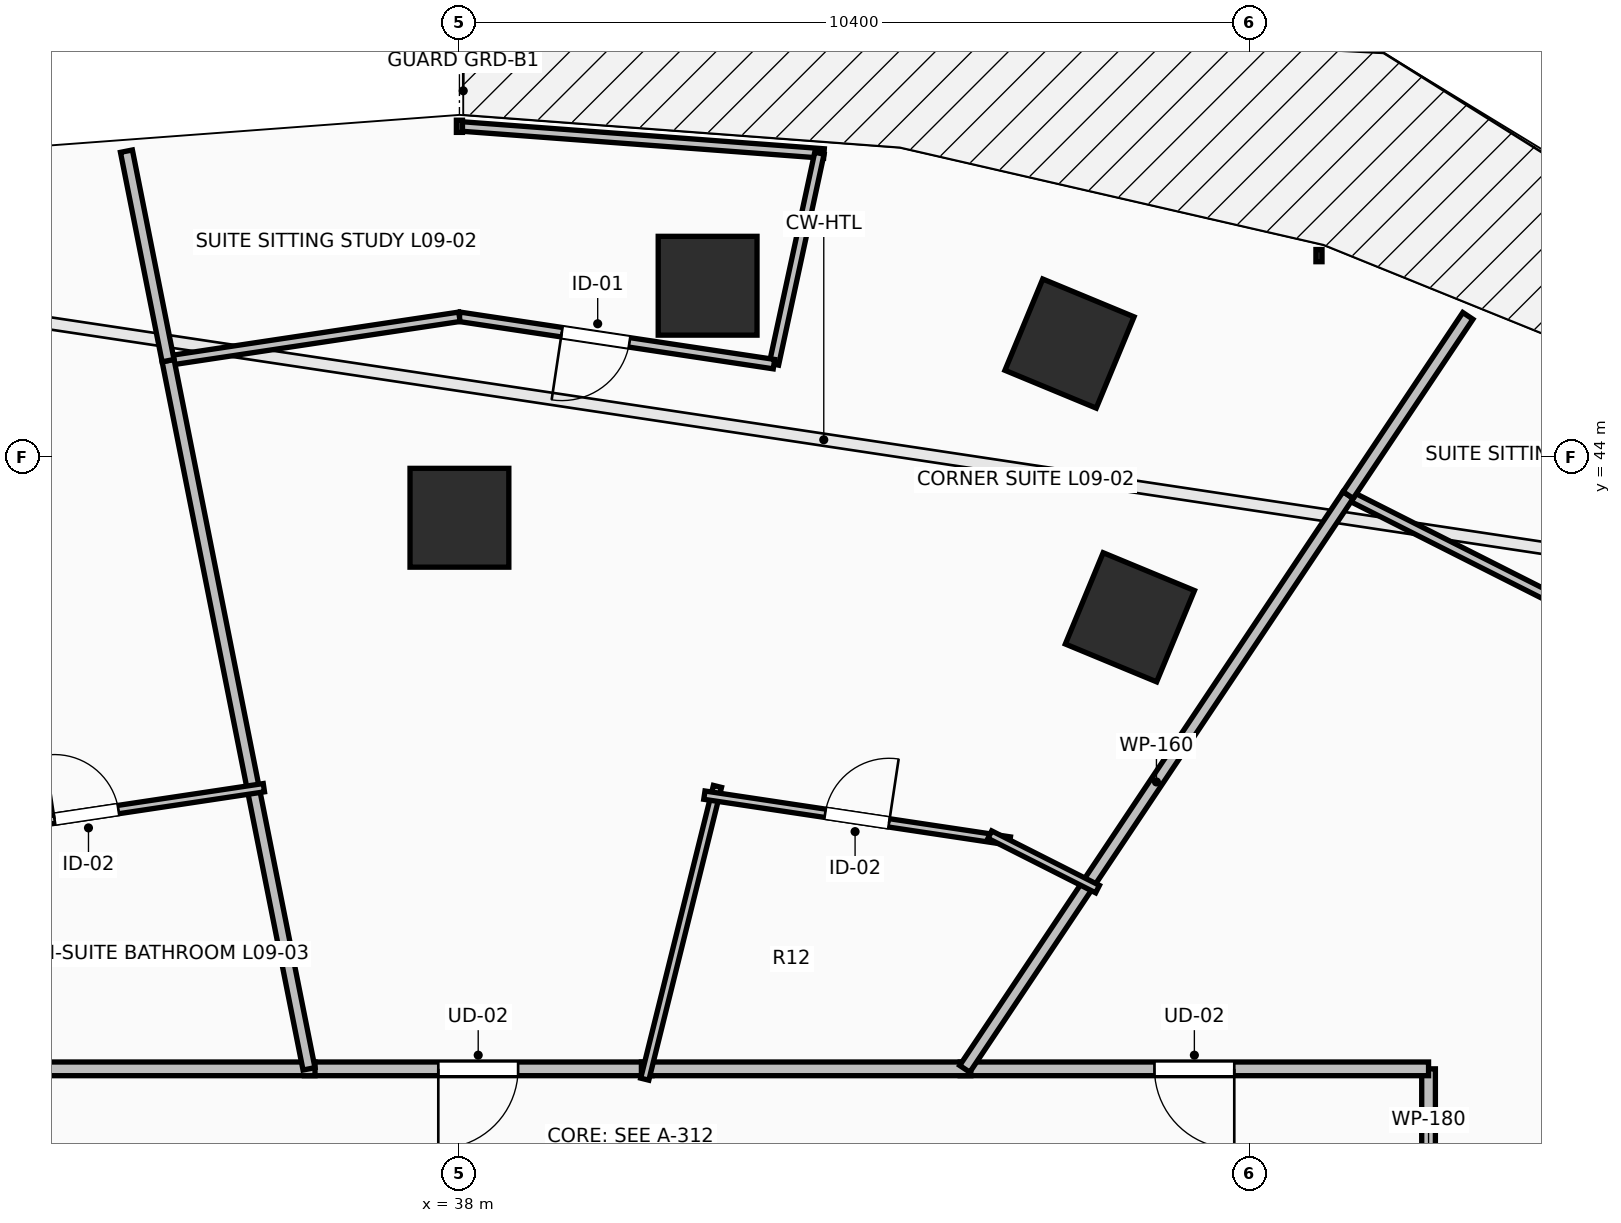
"""IFC4 building model, lengths in metres.
Left out: names, types, materials, properties, quantities, classifications, styles, units other than length and angle.
Written with IfcOpenShell. Run it as: python <this file> out.ifc"""

import sys

from ifc_helpers import new_model, si_unit, direction, frame, frame_2d, origin, origin_2d, place, context, subcontext, project, spatial, rectangle, extrude, element, fill, save


model = new_model("IFC4")
c1 = context("Model", 3, precision=1e-05, world=origin(), true_north=direction((0.0, 1.0)))
c2 = subcontext(c1, "Body", "Model", "MODEL_VIEW")
j1 = project(units=[si_unit("LENGTHUNIT", "METRE"), si_unit("PLANEANGLEUNIT", "RADIAN")], contexts=[c1])
p1 = place(None, origin())
s1 = spatial("IfcSite", under=j1, at=p1, CompositionType="ELEMENT")
p2 = place(p1, origin())
s2 = spatial("IfcBuilding", under=s1, at=p2, CompositionType="ELEMENT")
p3 = place(p2, frame((0.0, 0.0, 38.0)))
s3 = spatial("IfcBuildingStorey", under=s2, at=p3, CompositionType="ELEMENT", Elevation=38.0)
for number, where, z_axis, x_axis in (
    (1, (46.821, 41.891, 0.0), (0.0, 0.0, 1.0), (0.383, 0.924, 0.0)),
    (2, (38.0, 43.2, 0.0), (0.0, 0.0, 1.0), (0.0, 1.0, 0.0)),
    (3, (46.026, 45.492, 0.0), (0.0, 0.0, 1.0), (0.383, 0.924, 0.0)),
    (4, (41.265, 46.252, 0.0), (0.0, 0.0, 1.0), (0.0, 1.0, 0.0)),
):
    element("IfcColumn", number, at=place(p3, frame(where, z_axis=z_axis, x_axis=x_axis)), inside=s3, PredefinedType="COLUMN", context=c2, shape_type="SweptSolid", body=[
        extrude(rectangle(XDim=1.3, YDim=1.3, at=origin_2d()), origin(), (0.0, 0.0, 1.0), 3.5),
    ])
p4 = place(p3, frame((50.75, 33.616, 0.0), z_axis=(0.0, 0.0, 1.0), x_axis=(0.0, 1.0, 0.0)))
e5 = element("IfcWall", 5, at=p4, inside=s3, PredefinedType="PARTITIONING", context=c2, shape_type="SweptSolid", body=[
    extrude(rectangle(XDim=2.334, YDim=0.18, at=frame_2d((1.167, 0.0))), origin(), (0.0, 0.0, 1.0), 2.432),
])
p5 = place(p3, frame((50.75, 35.95, 0.0), z_axis=(0.0, 0.0, 1.0), x_axis=(-1.0, 0.0, 0.0)))
e6 = element("IfcWall", 6, at=p5, inside=s3, PredefinedType="PARTITIONING", context=c2, shape_type="SweptSolid", body=[
    extrude(rectangle(XDim=6.162, YDim=0.18, at=frame_2d((3.081, 0.0))), origin(), (0.0, 0.0, 1.0), 2.432),
])
p6 = place(p5, frame((2.556, 0.0, 0.0)))
e7 = element("IfcOpeningElement", 7, at=p6, cuts=e6, PredefinedType="OPENING", context=c2, shape_type="SweptSolid", body=[
    extrude(rectangle(XDim=1.05, YDim=2.2, at=frame_2d((0.525, 1.1))), frame((0.0, 0.105, 0.0), z_axis=(0.0, -1.0, 0.0), x_axis=(1.0, 0.0, 0.0)), (0.0, 0.0, 1.0), 0.21),
])
p7 = place(p3, frame((40.534, 35.95, 0.0), z_axis=(0.0, 0.0, 1.0), x_axis=(-1.0, 0.0, 0.0)))
e8 = element("IfcWall", 8, at=p7, inside=s3, PredefinedType="PARTITIONING", context=c2, shape_type="SweptSolid", body=[
    extrude(rectangle(XDim=4.574, YDim=0.18, at=frame_2d((2.287, 0.0))), origin(), (0.0, 0.0, 1.0), 3.24),
])
p8 = place(p7, frame((1.762, 0.0, 0.0)))
e9 = element("IfcOpeningElement", 9, at=p8, cuts=e8, PredefinedType="OPENING", context=c2, shape_type="SweptSolid", body=[
    extrude(rectangle(XDim=1.05, YDim=2.2, at=frame_2d((0.525, 1.1))), frame((0.0, 0.105, 0.0), z_axis=(0.0, -1.0, 0.0), x_axis=(1.0, 0.0, 0.0)), (0.0, 0.0, 1.0), 0.21),
])
p9 = place(p3, frame((44.728, 35.95, 0.0), z_axis=(0.0, 0.0, 1.0), x_axis=(-1.0, 0.0, 0.0)))
e10 = element("IfcWall", 10, at=p9, inside=s3, PredefinedType="PARTITIONING", context=c2, shape_type="SweptSolid", body=[
    extrude(rectangle(XDim=4.334, YDim=0.18, at=frame_2d((2.167, 0.0))), origin(), (0.0, 0.0, 1.0), 3.24),
])
p10 = place(p3, frame((36.1, 35.95, 0.0), z_axis=(0.0, 0.0, 1.0), x_axis=(-1.0, 0.0, 0.0)))
e11 = element("IfcWall", 11, at=p10, inside=s3, PredefinedType="PARTITIONING", context=c2, shape_type="SweptSolid", body=[
    extrude(rectangle(XDim=4.17, YDim=0.18, at=frame_2d((2.085, 0.0))), origin(), (0.0, 0.0, 1.0), 3.24),
])
p11 = place(p3, frame((56.554, 40.032, 0.0), z_axis=(0.0, 0.0, 1.0), x_axis=(-0.892545780062, 0.450956794487, 0.0)))
e12 = element("IfcWall", 12, at=p11, inside=s3, PredefinedType="PARTITIONING", context=c2, shape_type="SweptSolid", body=[
    extrude(rectangle(XDim=7.688, YDim=0.125, at=frame_2d((3.844, 0.0))), origin(), (0.0, 0.0, 1.0), 2.432),
])
p12 = place(p11, frame((3.394, 0.0, 0.0)))
e13 = element("IfcOpeningElement", 13, at=p12, cuts=e12, PredefinedType="OPENING", context=c2, shape_type="SweptSolid", body=[
    extrude(rectangle(XDim=0.9, YDim=2.1, at=frame_2d((0.45, 1.05))), frame((0.0, 0.077, 0.0), z_axis=(0.0, -1.0, 0.0), x_axis=(1.0, 0.0, 0.0)), (0.0, 0.0, 1.0), 0.155),
])
p13 = place(p3, frame((49.692, 43.499, 0.0), z_axis=(0.0, 0.0, 1.0), x_axis=(-0.555556259167, -0.831478949163, 0.0)))
e14 = element("IfcWall", 14, at=p13, inside=s3, PredefinedType="PARTITIONING", context=c2, shape_type="SweptSolid", body=[
    extrude(rectangle(XDim=9.079, YDim=0.16, at=frame_2d((4.54, 0.0))), origin(), (0.0, 0.0, 1.0), 2.432),
])
p14 = place(p3, frame((51.267, 45.856, 0.0), z_axis=(0.0, 0.0, 1.0), x_axis=(-0.555653789226, -0.831413775757, 0.0)))
e15 = element("IfcWall", 15, at=p14, inside=s3, PredefinedType="PARTITIONING", context=c2, shape_type="SweptSolid", body=[
    extrude(rectangle(XDim=2.835, YDim=0.16, at=frame_2d((1.417, 0.0))), origin(), (0.0, 0.0, 1.0), 2.624),
])
p15 = place(p3, frame((40.438, 35.814, 0.0), z_axis=(0.0, 0.0, 1.0), x_axis=(0.24101554649, 0.970521254971, 0.0)))
e16 = element("IfcWall", 16, at=p15, inside=s3, PredefinedType="PARTITIONING", context=c2, shape_type="SweptSolid", body=[
    extrude(rectangle(XDim=3.969, YDim=0.11, at=frame_2d((1.984, 0.0))), origin(), (0.0, 0.0, 1.0), 2.972),
])
p16 = place(p3, frame((41.223, 39.551, 0.0), z_axis=(0.0, 0.0, 1.0), x_axis=(0.988911221338, -0.148507899833, 0.0)))
e17 = element("IfcWall", 17, at=p16, inside=s3, PredefinedType="PARTITIONING", context=c2, shape_type="SweptSolid", body=[
    extrude(rectangle(XDim=4.064, YDim=0.11, at=frame_2d((2.032, 0.0))), origin(), (0.0, 0.0, 1.0), 3.24),
])
p17 = place(p16, frame((1.607, 0.0, 0.0)))
e18 = element("IfcOpeningElement", 18, at=p17, cuts=e17, PredefinedType="OPENING", context=c2, shape_type="SweptSolid", body=[
    extrude(rectangle(XDim=0.85, YDim=2.1, at=frame_2d((0.425, 1.05))), frame((0.0, 0.07, 0.0), z_axis=(0.0, -1.0, 0.0), x_axis=(1.0, 0.0, 0.0)), (0.0, 0.0, 1.0), 0.14),
])
p18 = place(p3, frame((44.978, 39.031, 0.0), z_axis=(0.0, 0.0, 1.0), x_axis=(0.892388427115, -0.451268096758, 0.0)))
e19 = element("IfcWall", 19, at=p18, inside=s3, PredefinedType="PARTITIONING", context=c2, shape_type="SweptSolid", body=[
    extrude(rectangle(XDim=1.588, YDim=0.11, at=frame_2d((0.794, 0.0))), origin(), (0.0, 0.0, 1.0), 3.24),
])
p19 = place(p3, frame((42.796, 47.992, 0.0), z_axis=(0.0, 0.0, 1.0), x_axis=(-0.99722311136, 0.074471915311, 0.0)))
e20 = element("IfcWall", 20, at=p19, inside=s3, PredefinedType="PARTITIONING", context=c2, shape_type="SweptSolid", body=[
    extrude(rectangle(XDim=4.809, YDim=0.125, at=frame_2d((2.405, 0.0))), origin(), (0.0, 0.0, 1.0), 3.24),
])
p20 = place(p3, frame((42.736, 47.996, 0.0), z_axis=(0.0, 0.0, 1.0), x_axis=(-0.210697687201, -0.977551269555, 0.0)))
e21 = element("IfcWall", 21, at=p20, inside=s3, PredefinedType="PARTITIONING", context=c2, shape_type="SweptSolid", body=[
    extrude(rectangle(XDim=2.839, YDim=0.125, at=frame_2d((1.419, 0.0))), origin(), (0.0, 0.0, 1.0), 2.624),
])
p21 = place(p3, frame((42.138, 45.221, 0.0), z_axis=(0.0, 0.0, 1.0), x_axis=(-0.988853606593, 0.148891049857, 0.0)))
e22 = element("IfcWall", 22, at=p21, inside=s3, PredefinedType="PARTITIONING", context=c2, shape_type="SweptSolid", body=[
    extrude(rectangle(XDim=4.185, YDim=0.125, at=frame_2d((2.092, 0.0))), origin(), (0.0, 0.0, 1.0), 2.432),
])
p22 = place(p21, frame((1.922, 0.0, 0.0)))
e23 = element("IfcOpeningElement", 23, at=p22, cuts=e22, PredefinedType="OPENING", context=c2, shape_type="SweptSolid", body=[
    extrude(rectangle(XDim=0.9, YDim=2.1, at=frame_2d((0.45, 1.05))), frame((0.0, 0.077, 0.0), z_axis=(0.0, -1.0, 0.0), x_axis=(1.0, 0.0, 0.0)), (0.0, 0.0, 1.0), 0.155),
])
p23 = place(p3, frame((38.0, 45.844, 0.0), z_axis=(0.0, 0.0, 1.0), x_axis=(-0.988862311426, -0.148833225599, 0.0)))
e24 = element("IfcWall", 24, at=p23, inside=s3, PredefinedType="PARTITIONING", context=c2, shape_type="SweptSolid", body=[
    extrude(rectangle(XDim=3.876, YDim=0.125, at=frame_2d((1.938, 0.0))), origin(), (0.0, 0.0, 1.0), 2.624),
])
p24 = place(p3, frame((34.167, 45.267, 0.0), z_axis=(0.0, 0.0, 1.0), x_axis=(0.19516219459, -0.980770981322, 0.0)))
e25 = element("IfcWall", 25, at=p24, inside=s3, PredefinedType="PARTITIONING", context=c2, shape_type="SweptSolid", body=[
    extrude(rectangle(XDim=9.5, YDim=0.16, at=frame_2d((4.75, 0.0))), origin(), (0.0, 0.0, 1.0), 2.432),
])
p25 = place(p3, frame((33.619, 48.023, 0.0), z_axis=(0.0, 0.0, 1.0), x_axis=(0.195063341769, -0.980790646722, 0.0)))
e26 = element("IfcWall", 26, at=p25, inside=s3, PredefinedType="PARTITIONING", context=c2, shape_type="SweptSolid", body=[
    extrude(rectangle(XDim=2.81, YDim=0.16, at=frame_2d((1.405, 0.0))), origin(), (0.0, 0.0, 1.0), 2.624),
])
p26 = place(p3, frame((30.759, 38.947, 0.0), z_axis=(0.0, 0.0, 1.0), x_axis=(0.9889029502, 0.148562966739, 0.0)))
e27 = element("IfcWall", 27, at=p26, inside=s3, PredefinedType="PARTITIONING", context=c2, shape_type="SweptSolid", body=[
    extrude(rectangle(XDim=4.721, YDim=0.11, at=frame_2d((2.361, 0.0))), origin(), (0.0, 0.0, 1.0), 2.432),
])
p27 = place(p26, frame((1.936, 0.0, 0.0)))
e28 = element("IfcOpeningElement", 28, at=p27, cuts=e27, PredefinedType="OPENING", context=c2, shape_type="SweptSolid", body=[
    extrude(rectangle(XDim=0.85, YDim=2.1, at=frame_2d((0.425, 1.05))), frame((0.0, 0.07, 0.0), z_axis=(0.0, -1.0, 0.0), x_axis=(1.0, 0.0, 0.0)), (0.0, 0.0, 1.0), 0.14),
])
p28 = place(p6, origin())
e29 = element("IfcDoor", 29, at=p28, inside=s3, OperationType="SINGLE_SWING_LEFT", PredefinedType="DOOR", context=c2, shape_type="SweptSolid", body=[
    extrude(rectangle(XDim=1.05, YDim=2.2, at=frame_2d((0.525, 1.1))), frame((0.0, 0.025, 0.0), z_axis=(0.0, -1.0, 0.0), x_axis=(1.0, 0.0, 0.0)), (0.0, 0.0, 1.0), 0.05),
])
fill(e7, e29)
p29 = place(p8, origin())
e30 = element("IfcDoor", 30, at=p29, inside=s3, OperationType="SINGLE_SWING_RIGHT", PredefinedType="DOOR", context=c2, shape_type="SweptSolid", body=[
    extrude(rectangle(XDim=1.05, YDim=2.2, at=frame_2d((0.525, 1.1))), frame((0.0, 0.025, 0.0), z_axis=(0.0, -1.0, 0.0), x_axis=(1.0, 0.0, 0.0)), (0.0, 0.0, 1.0), 0.05),
])
fill(e9, e30)
p30 = place(p17, origin())
e31 = element("IfcDoor", 31, at=p30, inside=s3, OperationType="SINGLE_SWING_RIGHT", PredefinedType="DOOR", context=c2, shape_type="SweptSolid", body=[
    extrude(rectangle(XDim=0.85, YDim=2.1, at=frame_2d((0.425, 1.05))), frame((0.0, 0.025, 0.0), z_axis=(0.0, -1.0, 0.0), x_axis=(1.0, 0.0, 0.0)), (0.0, 0.0, 1.0), 0.05),
])
fill(e18, e31)
p31 = place(p22, origin())
e32 = element("IfcDoor", 32, at=p31, inside=s3, OperationType="SINGLE_SWING_RIGHT", PredefinedType="DOOR", context=c2, shape_type="SweptSolid", body=[
    extrude(rectangle(XDim=0.9, YDim=2.1, at=frame_2d((0.45, 1.05))), frame((0.0, 0.025, 0.0), z_axis=(0.0, -1.0, 0.0), x_axis=(1.0, 0.0, 0.0)), (0.0, 0.0, 1.0), 0.05),
])
fill(e23, e32)
p32 = place(p27, origin())
e33 = element("IfcDoor", 33, at=p32, inside=s3, OperationType="SINGLE_SWING_LEFT", PredefinedType="DOOR", context=c2, shape_type="SweptSolid", body=[
    extrude(rectangle(XDim=0.85, YDim=2.1, at=frame_2d((0.425, 1.05))), frame((0.0, 0.025, 0.0), z_axis=(0.0, -1.0, 0.0), x_axis=(1.0, 0.0, 0.0)), (0.0, 0.0, 1.0), 0.05),
])
fill(e28, e33)
save(model, sys.argv[1])
